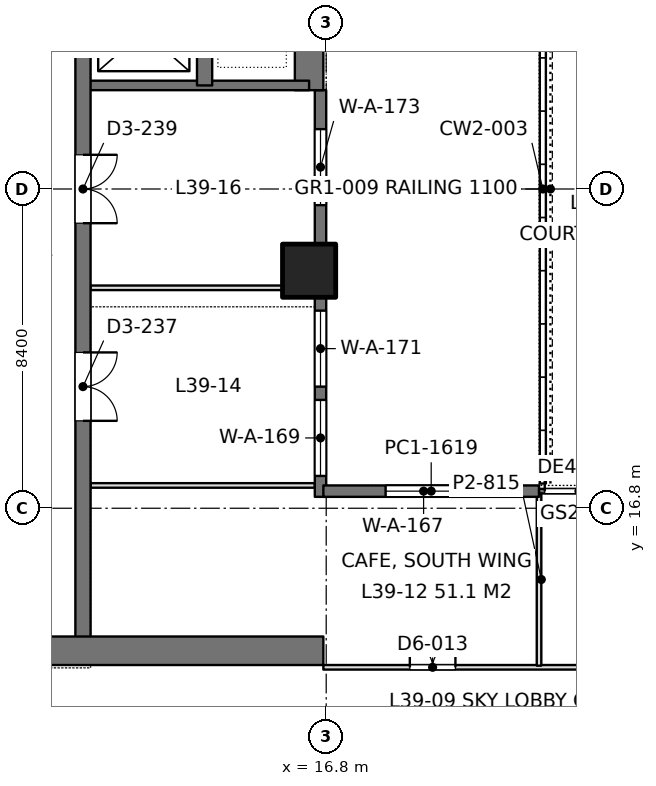
"""IFC4 building model, lengths in metres.
Left out: names, types, materials, properties, quantities, classifications, styles, units other than length and angle.
Written with IfcOpenShell. Run it as: python <this file> out.ifc"""

import sys

from ifc_helpers import new_model, si_unit, direction, frame, frame_2d, origin, origin_2d, place, context, subcontext, project, spatial, rectangle, extrude, element, fill, save


model = new_model("IFC4")
c1 = context("Model", 3, precision=1e-05, world=origin(), true_north=direction((0.0, 1.0)))
c2 = subcontext(c1, "Body", "Model", "MODEL_VIEW")
j1 = project(units=[si_unit("LENGTHUNIT", "METRE"), si_unit("PLANEANGLEUNIT", "RADIAN")], contexts=[c1])
p1 = place(None, origin())
s1 = spatial("IfcSite", under=j1, at=p1, CompositionType="ELEMENT")
p2 = place(p1, origin())
s2 = spatial("IfcBuilding", under=s1, at=p2, CompositionType="ELEMENT")
p3 = place(p2, frame((0.0, 0.0, 173.4)))
s3 = spatial("IfcBuildingStorey", under=s2, at=p3, CompositionType="ELEMENT", Elevation=173.4)
p4 = place(p3, frame((16.35, 23.05, 0.0), z_axis=(0.0, 0.0, 1.0), x_axis=(1.0, 0.0, 0.0)))
e1 = element("IfcColumn", 1, at=p4, inside=s3, PredefinedType="COLUMN", context=c2, shape_type="SweptSolid", body=[
    extrude(rectangle(XDim=1.4, YDim=1.4, at=origin_2d()), origin(), (0.0, 0.0, 1.0), 4.2),
])
p5 = place(p3, frame((-1.125, 13.05, 0.0), z_axis=(0.0, 0.0, 1.0), x_axis=(1.0, 0.0, 0.0)))
e2 = element("IfcWall", 2, at=p5, inside=s3, PredefinedType="SHEAR", context=c2, shape_type="SweptSolid", body=[
    extrude(rectangle(XDim=17.85, YDim=0.75, at=frame_2d((8.925, 0.0))), origin(), (0.0, 0.0, 1.0), 4.2),
])
p6 = place(p5, frame((8.875, 0.0, 0.0)))
e3 = element("IfcOpeningElement", 3, at=p6, cuts=e2, PredefinedType="OPENING", context=c2, shape_type="SweptSolid", body=[
    extrude(rectangle(XDim=1.8, YDim=2.4, at=frame_2d((0.9, 1.2))), frame((0.0, 0.385, 0.0), z_axis=(0.0, -1.0, 0.0), x_axis=(1.0, 0.0, 0.0)), (0.0, 0.0, 1.0), 0.77),
])
p7 = place(p3, frame((16.35, 27.8, 0.0), z_axis=(0.0, 0.0, 1.0), x_axis=(0.0, 1.0, 0.0)))
e4 = element("IfcWall", 4, at=p7, inside=s3, PredefinedType="SHEAR", context=c2, shape_type="SweptSolid", body=[
    extrude(rectangle(XDim=9.55, YDim=0.75, at=frame_2d((4.775, 0.0))), origin(), (0.0, 0.0, 1.0), 4.2),
])
p8 = place(p3, frame((10.4, 13.05, 0.0), z_axis=(0.0, 0.0, 1.0), x_axis=(0.0, 1.0, 0.0)))
e5 = element("IfcWall", 5, at=p8, inside=s3, PredefinedType="SHEAR", context=c2, shape_type="SweptSolid", body=[
    extrude(rectangle(XDim=24.3, YDim=0.4, at=frame_2d((12.15, 0.0))), origin(), (0.0, 0.0, 1.0), 4.2),
])
p9 = place(p8, frame((15.75, 0.0, 0.0)))
e6 = element("IfcOpeningElement", 6, at=p9, cuts=e5, PredefinedType="OPENING", context=c2, shape_type="SweptSolid", body=[
    extrude(rectangle(XDim=1.1, YDim=2.2, at=frame_2d((0.55, 1.1))), frame((0.0, 0.21, 0.0), z_axis=(0.0, -1.0, 0.0), x_axis=(1.0, 0.0, 0.0)), (0.0, 0.0, 1.0), 0.42),
])
p10 = place(p8, frame((18.6, 0.0, 0.0)))
e7 = element("IfcOpeningElement", 7, at=p10, cuts=e5, PredefinedType="OPENING", context=c2, shape_type="SweptSolid", body=[
    extrude(rectangle(XDim=1.1, YDim=2.2, at=frame_2d((0.55, 1.1))), frame((0.0, 0.21, 0.0), z_axis=(0.0, -1.0, 0.0), x_axis=(1.0, 0.0, 0.0)), (0.0, 0.0, 1.0), 0.42),
])
p11 = place(p8, frame((21.45, 0.0, 0.0)))
e8 = element("IfcOpeningElement", 8, at=p11, cuts=e5, PredefinedType="OPENING", context=c2, shape_type="SweptSolid", body=[
    extrude(rectangle(XDim=1.1, YDim=2.2, at=frame_2d((0.55, 1.1))), frame((0.0, 0.21, 0.0), z_axis=(0.0, -1.0, 0.0), x_axis=(1.0, 0.0, 0.0)), (0.0, 0.0, 1.0), 0.42),
])
p12 = place(p8, frame((6.05, 0.0, 0.0)))
e9 = element("IfcOpeningElement", 9, at=p12, cuts=e5, PredefinedType="OPENING", context=c2, shape_type="SweptSolid", body=[
    extrude(rectangle(XDim=1.8, YDim=2.4, at=frame_2d((0.9, 1.2))), frame((0.0, 0.21, 0.0), z_axis=(0.0, -1.0, 0.0), x_axis=(1.0, 0.0, 0.0)), (0.0, 0.0, 1.0), 0.42),
])
p13 = place(p8, frame((11.25, 0.0, 0.0)))
e10 = element("IfcOpeningElement", 10, at=p13, cuts=e5, PredefinedType="OPENING", context=c2, shape_type="SweptSolid", body=[
    extrude(rectangle(XDim=1.8, YDim=2.4, at=frame_2d((0.9, 1.2))), frame((0.0, 0.21, 0.0), z_axis=(0.0, -1.0, 0.0), x_axis=(1.0, 0.0, 0.0)), (0.0, 0.0, 1.0), 0.42),
])
p14 = place(p3, frame((13.6, 27.925, 0.0), z_axis=(0.0, 0.0, 1.0), x_axis=(0.0, 1.0, 0.0)))
e11 = element("IfcWall", 11, at=p14, inside=s3, PredefinedType="SHEAR", context=c2, shape_type="SweptSolid", body=[
    extrude(rectangle(XDim=9.425, YDim=0.4, at=frame_2d((4.712, 0.0))), origin(), (0.0, 0.0, 1.0), 4.2),
])
p15 = place(p3, frame((10.4, 27.925, 0.0), z_axis=(0.0, 0.0, 1.0), x_axis=(1.0, 0.0, 0.0)))
e12 = element("IfcWall", 12, at=p15, inside=s3, PredefinedType="SHEAR", context=c2, shape_type="SweptSolid", body=[
    extrude(rectangle(XDim=5.95, YDim=0.25, at=frame_2d((2.975, 0.0))), origin(), (0.0, 0.0, 1.0), 4.2),
])
p16 = place(p3, frame((16.65, 17.1, 0.0), z_axis=(0.0, 0.0, 1.0), x_axis=(0.0, 1.0, 0.0)))
e13 = element("IfcWall", 13, at=p16, inside=s3, PredefinedType="SOLIDWALL", context=c2, shape_type="SweptSolid", body=[
    extrude(rectangle(XDim=10.7, YDim=0.3, at=frame_2d((5.35, 0.0))), origin(), (0.0, 0.0, 1.0), 4.05),
])
p17 = place(p16, frame((0.55, 0.0, 0.1)))
e14 = element("IfcOpeningElement", 14, at=p17, cuts=e13, PredefinedType="OPENING", context=c2, shape_type="SweptSolid", body=[
    extrude(rectangle(XDim=2.0, YDim=3.0, at=frame_2d((1.0, 1.5))), frame((0.0, 0.16, 0.0), z_axis=(0.0, -1.0, 0.0), x_axis=(1.0, 0.0, 0.0)), (0.0, 0.0, 1.0), 0.32),
])
p18 = place(p16, frame((2.9, 0.0, 0.1)))
e15 = element("IfcOpeningElement", 15, at=p18, cuts=e13, PredefinedType="OPENING", context=c2, shape_type="SweptSolid", body=[
    extrude(rectangle(XDim=2.0, YDim=3.0, at=frame_2d((1.0, 1.5))), frame((0.0, 0.16, 0.0), z_axis=(0.0, -1.0, 0.0), x_axis=(1.0, 0.0, 0.0)), (0.0, 0.0, 1.0), 0.32),
])
p19 = place(p16, frame((7.675, 0.0, 0.1)))
e16 = element("IfcOpeningElement", 16, at=p19, cuts=e13, PredefinedType="OPENING", context=c2, shape_type="SweptSolid", body=[
    extrude(rectangle(XDim=2.0, YDim=3.0, at=frame_2d((1.0, 1.5))), frame((0.0, 0.16, 0.0), z_axis=(0.0, -1.0, 0.0), x_axis=(1.0, 0.0, 0.0)), (0.0, 0.0, 1.0), 0.32),
])
p20 = place(p3, frame((16.725, 17.25, 0.0), z_axis=(0.0, 0.0, 1.0), x_axis=(1.0, 0.0, 0.0)))
e17 = element("IfcWall", 17, at=p20, inside=s3, PredefinedType="SOLIDWALL", context=c2, shape_type="SweptSolid", body=[
    extrude(rectangle(XDim=5.675, YDim=0.3, at=frame_2d((2.837, 0.0))), origin(), (0.0, 0.0, 1.0), 4.05),
])
p21 = place(p20, frame((1.637, 0.0, 0.1)))
e18 = element("IfcOpeningElement", 18, at=p21, cuts=e17, PredefinedType="OPENING", context=c2, shape_type="SweptSolid", body=[
    extrude(rectangle(XDim=2.0, YDim=3.0, at=frame_2d((1.0, 1.5))), frame((0.0, 0.16, 0.0), z_axis=(0.0, -1.0, 0.0), x_axis=(1.0, 0.0, 0.0)), (0.0, 0.0, 1.0), 0.32),
])
p22 = place(p3, frame((22.4, 17.25, 0.0), z_axis=(0.0, 0.0, 1.0), x_axis=(1.0, 0.0, 0.0)))
e19 = element("IfcWall", 19, at=p22, inside=s3, PredefinedType="SOLIDWALL", context=c2, shape_type="SweptSolid", body=[
    extrude(rectangle(XDim=2.25, YDim=0.12, at=frame_2d((1.125, 0.0))), origin(), (0.0, 0.0, 1.0), 4.05),
])
p23 = place(p22, frame((0.15, 0.0, 0.0)))
e20 = element("IfcOpeningElement", 20, at=p23, cuts=e19, PredefinedType="OPENING", context=c2, shape_type="SweptSolid", body=[
    extrude(rectangle(XDim=1.8, YDim=2.4, at=frame_2d((0.9, 1.2))), frame((0.0, 0.07, 0.0), z_axis=(0.0, -1.0, 0.0), x_axis=(1.0, 0.0, 0.0)), (0.0, 0.0, 1.0), 0.14),
])
p24 = place(p3, frame((10.598, 17.4, 0.0), z_axis=(0.0, 0.0, 1.0), x_axis=(1.0, 0.0, 0.0)))
e21 = element("IfcWall", 21, at=p24, inside=s3, PredefinedType="PARTITIONING", context=c2, shape_type="SweptSolid", body=[
    extrude(rectangle(XDim=5.904, YDim=0.12, at=frame_2d((2.952, 0.0))), origin(), (0.0, 0.0, 1.0), 3.55),
])
p25 = place(p3, frame((10.598, 22.6, 0.0), z_axis=(0.0, 0.0, 1.0), x_axis=(1.0, 0.0, 0.0)))
e22 = element("IfcWall", 22, at=p25, inside=s3, PredefinedType="PARTITIONING", context=c2, shape_type="SweptSolid", body=[
    extrude(rectangle(XDim=5.053, YDim=0.12, at=frame_2d((2.526, 0.0))), origin(), (0.0, 0.0, 1.0), 4.05),
])
p26 = place(p3, frame((16.725, 12.615, 0.0), z_axis=(0.0, 0.0, 1.0), x_axis=(1.0, 0.0, 0.0)))
e23 = element("IfcWall", 23, at=p26, inside=s3, PredefinedType="PARTITIONING", context=c2, shape_type="SweptSolid", body=[
    extrude(rectangle(XDim=16.95, YDim=0.12, at=frame_2d((8.475, 0.0))), origin(), (0.0, 0.0, 1.0), 3.55),
])
p27 = place(p26, frame((2.275, 0.0, 0.0)))
e24 = element("IfcOpeningElement", 24, at=p27, cuts=e23, PredefinedType="OPENING", context=c2, shape_type="SweptSolid", body=[
    extrude(rectangle(XDim=1.2, YDim=2.2, at=frame_2d((0.6, 1.1))), frame((0.0, 0.07, 0.0), z_axis=(0.0, -1.0, 0.0), x_axis=(1.0, 0.0, 0.0)), (0.0, 0.0, 1.0), 0.14),
])
p28 = place(p26, frame((7.575, 0.0, 0.0)))
e25 = element("IfcOpeningElement", 25, at=p28, cuts=e23, PredefinedType="OPENING", context=c2, shape_type="SweptSolid", body=[
    extrude(rectangle(XDim=1.8, YDim=2.2, at=frame_2d((0.9, 1.1))), frame((0.0, 0.07, 0.0), z_axis=(0.0, -1.0, 0.0), x_axis=(1.0, 0.0, 0.0)), (0.0, 0.0, 1.0), 0.14),
])
p29 = place(p26, frame((13.475, 0.0, 0.0)))
e26 = element("IfcOpeningElement", 26, at=p29, cuts=e23, PredefinedType="OPENING", context=c2, shape_type="SweptSolid", body=[
    extrude(rectangle(XDim=1.2, YDim=2.2, at=frame_2d((0.6, 1.1))), frame((0.0, 0.07, 0.0), z_axis=(0.0, -1.0, 0.0), x_axis=(1.0, 0.0, 0.0)), (0.0, 0.0, 1.0), 0.14),
])
p30 = place(p3, frame((22.4, 12.658, 0.0), z_axis=(0.0, 0.0, 1.0), x_axis=(0.0, 1.0, 0.0)))
e27 = element("IfcWall", 27, at=p30, inside=s3, PredefinedType="PARTITIONING", context=c2, shape_type="SweptSolid", body=[
    extrude(rectangle(XDim=4.534, YDim=0.12, at=frame_2d((2.267, 0.0))), origin(), (0.0, 0.0, 1.0), 3.2),
])
p31 = place(p17, origin())
e28 = element("IfcWindow", 28, at=p31, inside=s3, PartitioningType="SINGLE_PANEL", PredefinedType="WINDOW", context=c2, shape_type="SweptSolid", body=[
    extrude(rectangle(XDim=2.0, YDim=3.0, at=frame_2d((1.0, 1.5))), frame((0.0, 0.03, 0.0), z_axis=(0.0, -1.0, 0.0), x_axis=(1.0, 0.0, 0.0)), (0.0, 0.0, 1.0), 0.06),
])
fill(e14, e28)
p32 = place(p18, origin())
e29 = element("IfcWindow", 29, at=p32, inside=s3, PartitioningType="SINGLE_PANEL", PredefinedType="WINDOW", context=c2, shape_type="SweptSolid", body=[
    extrude(rectangle(XDim=2.0, YDim=3.0, at=frame_2d((1.0, 1.5))), frame((0.0, 0.03, 0.0), z_axis=(0.0, -1.0, 0.0), x_axis=(1.0, 0.0, 0.0)), (0.0, 0.0, 1.0), 0.06),
])
fill(e15, e29)
p33 = place(p19, origin())
e30 = element("IfcWindow", 30, at=p33, inside=s3, PartitioningType="SINGLE_PANEL", PredefinedType="WINDOW", context=c2, shape_type="SweptSolid", body=[
    extrude(rectangle(XDim=2.0, YDim=3.0, at=frame_2d((1.0, 1.5))), frame((0.0, 0.03, 0.0), z_axis=(0.0, -1.0, 0.0), x_axis=(1.0, 0.0, 0.0)), (0.0, 0.0, 1.0), 0.06),
])
fill(e16, e30)
p34 = place(p21, origin())
e31 = element("IfcWindow", 31, at=p34, inside=s3, PartitioningType="SINGLE_PANEL", PredefinedType="WINDOW", context=c2, shape_type="SweptSolid", body=[
    extrude(rectangle(XDim=2.0, YDim=3.0, at=frame_2d((1.0, 1.5))), frame((0.0, 0.03, 0.0), z_axis=(0.0, -1.0, 0.0), x_axis=(1.0, 0.0, 0.0)), (0.0, 0.0, 1.0), 0.06),
])
fill(e18, e31)
p35 = place(p23, origin())
e32 = element("IfcDoor", 32, at=p35, inside=s3, OperationType="DOUBLE_DOOR_SINGLE_SWING", PredefinedType="DOOR", context=c2, shape_type="SweptSolid", body=[
    extrude(rectangle(XDim=1.8, YDim=2.4, at=frame_2d((0.9, 1.2))), frame((0.0, 0.025, 0.0), z_axis=(0.0, -1.0, 0.0), x_axis=(1.0, 0.0, 0.0)), (0.0, 0.0, 1.0), 0.05),
])
fill(e20, e32)
p36 = place(p12, frame((1.8, 0.0, 0.0), z_axis=(0.0, 0.0, 1.0), x_axis=(-1.0, 0.0, 0.0)))
e33 = element("IfcDoor", 33, at=p36, inside=s3, OperationType="DOUBLE_DOOR_SINGLE_SWING", PredefinedType="DOOR", context=c2, shape_type="SweptSolid", body=[
    extrude(rectangle(XDim=1.8, YDim=2.4, at=frame_2d((0.9, 1.2))), frame((0.0, 0.025, 0.0), z_axis=(0.0, -1.0, 0.0), x_axis=(1.0, 0.0, 0.0)), (0.0, 0.0, 1.0), 0.05),
])
fill(e9, e33)
p37 = place(p13, frame((1.8, 0.0, 0.0), z_axis=(0.0, 0.0, 1.0), x_axis=(-1.0, 0.0, 0.0)))
e34 = element("IfcDoor", 34, at=p37, inside=s3, OperationType="DOUBLE_DOOR_SINGLE_SWING", PredefinedType="DOOR", context=c2, shape_type="SweptSolid", body=[
    extrude(rectangle(XDim=1.8, YDim=2.4, at=frame_2d((0.9, 1.2))), frame((0.0, 0.025, 0.0), z_axis=(0.0, -1.0, 0.0), x_axis=(1.0, 0.0, 0.0)), (0.0, 0.0, 1.0), 0.05),
])
fill(e10, e34)
p38 = place(p27, origin())
e35 = element("IfcDoor", 35, at=p38, inside=s3, OperationType="DOUBLE_DOOR_SINGLE_SWING_OPPOSITE_LEFT", PredefinedType="DOOR", context=c2, shape_type="SweptSolid", body=[
    extrude(rectangle(XDim=1.2, YDim=2.2, at=frame_2d((0.6, 1.1))), frame((0.0, 0.025, 0.0), z_axis=(0.0, -1.0, 0.0), x_axis=(1.0, 0.0, 0.0)), (0.0, 0.0, 1.0), 0.05),
])
fill(e24, e35)
save(model, sys.argv[1])
